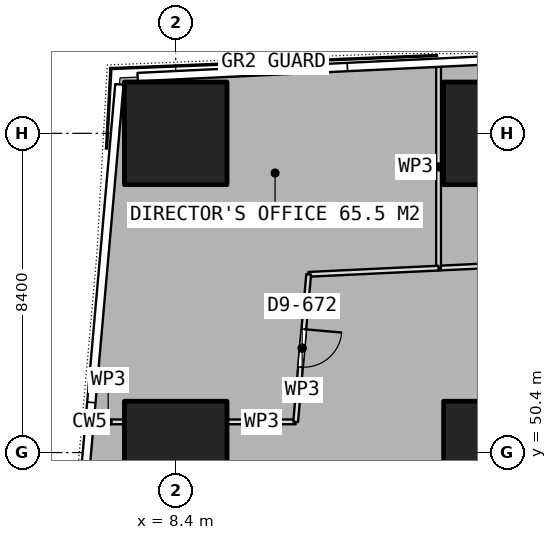
"""IFC4 building model, lengths in metres.
Left out: names, types, materials, properties, quantities, classifications, styles, units other than length and angle.
Written with IfcOpenShell. Run it as: python <this file> out.ifc"""

import sys

from ifc_helpers import new_model, si_unit, direction, frame, frame_2d, origin, origin_2d, place, context, subcontext, project, spatial, rectangle, extrude, element, fill, save


model = new_model("IFC4")
c1 = context("Model", 3, precision=1e-05, world=origin(), true_north=direction((0.0, 1.0)))
c2 = subcontext(c1, "Body", "Model", "MODEL_VIEW")
j1 = project(units=[si_unit("LENGTHUNIT", "METRE"), si_unit("PLANEANGLEUNIT", "RADIAN")], contexts=[c1])
p1 = place(None, origin())
s1 = spatial("IfcSite", under=j1, at=p1, CompositionType="ELEMENT")
p2 = place(p1, origin())
s2 = spatial("IfcBuilding", under=s1, at=p2, CompositionType="ELEMENT")
p3 = place(p2, frame((0.0, 0.0, 168.2)))
s3 = spatial("IfcBuildingStorey", under=s2, at=p3, CompositionType="ELEMENT", Elevation=168.2)
for number, where, z_axis, x_axis in (
    (1, (8.4, 50.4, 0.0), (0.0, 0.0, 1.0), (1.0, 0.0, 0.0)),
    (2, (8.4, 58.8, 0.0), (0.0, 0.0, 1.0), (1.0, 0.0, 0.0)),
    (3, (16.8, 50.4, 0.0), (0.0, 0.0, 1.0), (1.0, 0.0, 0.0)),
    (4, (16.8, 58.8, 0.0), (0.0, 0.0, 1.0), (1.0, 0.0, 0.0)),
):
    element("IfcColumn", number, at=place(p3, frame(where, z_axis=z_axis, x_axis=x_axis)), inside=s3, PredefinedType="COLUMN", context=c2, shape_type="SweptSolid", body=[
        extrude(rectangle(XDim=2.7, YDim=2.7, at=origin_2d()), origin(), (0.0, 0.0, 1.0), 4.5),
    ])
p4 = place(p3, frame((22.403, 55.592, 0.0), z_axis=(0.0, 0.0, 1.0), x_axis=(-0.998856898281, -0.047800593685, 0.0)))
e5 = element("IfcWall", 5, at=p4, inside=s3, PredefinedType="PARTITIONING", context=c2, shape_type="SweptSolid", body=[
    extrude(rectangle(XDim=7.094, YDim=0.125, at=frame_2d((3.547, 0.0))), origin(), (0.0, 0.0, 1.0), 4.25),
])
p5 = place(p4, frame((3.047, 0.0, 0.0)))
e6 = element("IfcOpeningElement", 6, at=p5, cuts=e5, PredefinedType="OPENING", context=c2, shape_type="SweptSolid", body=[
    extrude(rectangle(XDim=1.0, YDim=2.1, at=frame_2d((0.5, 1.05))), frame((0.0, 0.073, 0.0), z_axis=(0.0, -1.0, 0.0), x_axis=(1.0, 0.0, 0.0)), (0.0, 0.0, 1.0), 0.145),
])
p6 = place(p3, frame((15.317, 55.253, 0.0), z_axis=(0.0, 0.0, 1.0), x_axis=(0.0, 1.0, 0.0)))
e7 = element("IfcWall", 7, at=p6, inside=s3, PredefinedType="PARTITIONING", context=c2, shape_type="SweptSolid", body=[
    extrude(rectangle(XDim=5.327, YDim=0.125, at=frame_2d((2.664, 0.0))), origin(), (0.0, 0.0, 1.0), 4.25),
])
p7 = place(p3, frame((11.556, 51.208, 0.0), z_axis=(0.0, 0.0, 1.0), x_axis=(-1.0, 0.0, 0.0)))
e8 = element("IfcWall", 8, at=p7, inside=s3, PredefinedType="PARTITIONING", context=c2, shape_type="SweptSolid", body=[
    extrude(rectangle(XDim=1.786, YDim=0.125, at=frame_2d((0.893, 0.0))), origin(), (0.0, 0.0, 1.0), 4.25),
])
p8 = place(p3, frame((7.03, 51.208, 0.0), z_axis=(0.0, 0.0, 1.0), x_axis=(-1.0, 0.0, 0.0)))
e9 = element("IfcWall", 9, at=p8, inside=s3, PredefinedType="PARTITIONING", context=c2, shape_type="SweptSolid", body=[
    extrude(rectangle(XDim=0.815, YDim=0.125, at=frame_2d((0.407, 0.0))), origin(), (0.0, 0.0, 1.0), 4.25),
])
p9 = place(p3, frame((15.316, 55.253, 0.0), z_axis=(0.0, 0.0, 1.0), x_axis=(-0.998866360902, -0.047602448037, 0.0)))
e10 = element("IfcWall", 10, at=p9, inside=s3, PredefinedType="PARTITIONING", context=c2, shape_type="SweptSolid", body=[
    extrude(rectangle(XDim=3.421, YDim=0.125, at=frame_2d((1.71, 0.0))), origin(), (0.0, 0.0, 1.0), 4.25),
])
p10 = place(p3, frame((11.899, 55.09, 0.0), z_axis=(0.0, 0.0, 1.0), x_axis=(-0.088016303569, -0.996119034205, 0.0)))
e11 = element("IfcWall", 11, at=p10, inside=s3, PredefinedType="PARTITIONING", context=c2, shape_type="SweptSolid", body=[
    extrude(rectangle(XDim=3.897, YDim=0.125, at=frame_2d((1.949, 0.0))), origin(), (0.0, 0.0, 1.0), 4.25),
])
p11 = place(p10, frame((1.449, 0.0, 0.0)))
e12 = element("IfcOpeningElement", 12, at=p11, cuts=e11, PredefinedType="OPENING", context=c2, shape_type="SweptSolid", body=[
    extrude(rectangle(XDim=1.0, YDim=2.1, at=frame_2d((0.5, 1.05))), frame((0.0, 0.073, 0.0), z_axis=(0.0, -1.0, 0.0), x_axis=(1.0, 0.0, 0.0)), (0.0, 0.0, 1.0), 0.145),
])
p12 = place(p11, origin())
e13 = element("IfcDoor", 13, at=p12, inside=s3, OperationType="SINGLE_SWING_LEFT", PredefinedType="DOOR", context=c2, shape_type="SweptSolid", body=[
    extrude(rectangle(XDim=1.0, YDim=2.1, at=frame_2d((0.5, 1.05))), frame((0.0, 0.025, 0.0), z_axis=(0.0, -1.0, 0.0), x_axis=(1.0, 0.0, 0.0)), (0.0, 0.0, 1.0), 0.05),
])
fill(e12, e13)
save(model, sys.argv[1])
